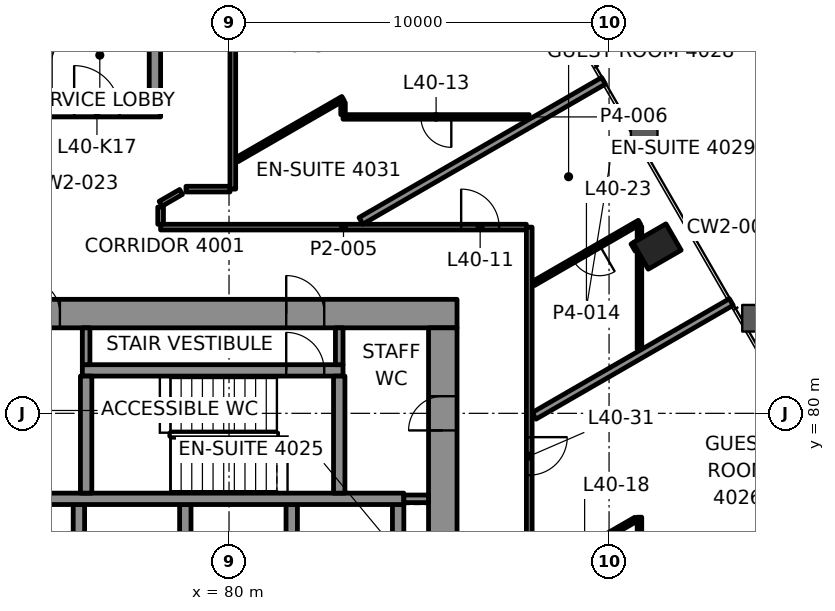
"""IFC4 building model, lengths in metres.
Left out: names, types, materials, properties, quantities, classifications, styles, units other than length and angle.
Written with IfcOpenShell. Run it as: python <this file> out.ifc"""

import sys

from ifc_helpers import new_model, si_unit, direction, frame, frame_2d, origin, origin_2d, place, context, subcontext, project, spatial, rectangle, hollow_rectangle, extrude, element, fill, save


model = new_model("IFC4")
c1 = context("Model", 3, precision=1e-05, world=origin(), true_north=direction((0.0, 1.0)))
c2 = subcontext(c1, "Body", "Model", "MODEL_VIEW")
j1 = project(units=[si_unit("LENGTHUNIT", "METRE"), si_unit("PLANEANGLEUNIT", "RADIAN")], contexts=[c1])
p1 = place(None, origin())
s1 = spatial("IfcSite", under=j1, at=p1, CompositionType="ELEMENT")
p2 = place(p1, origin())
s2 = spatial("IfcBuilding", under=s1, at=p2, CompositionType="ELEMENT")
p3 = place(p2, frame((0.0, 0.0, 175.3)))
s3 = spatial("IfcBuildingStorey", under=s2, at=p3, CompositionType="ELEMENT", Elevation=175.3)
p4 = place(p3, frame((91.263, 84.39, -0.0), z_axis=(0.0, 0.0, 1.0), x_axis=(-0.5, 0.866025403784, 0.0)))
e1 = element("IfcColumn", 1, at=p4, inside=s3, PredefinedType="COLUMN", context=c2, shape_type="SweptSolid", body=[
    extrude(hollow_rectangle(XDim=0.8, YDim=1.0, WallThickness=0.05, at=origin_2d()), origin(), (0.0, 0.0, 1.0), 3.9),
])
p5 = place(p3, frame((64.0, 82.625, 0.0), z_axis=(0.0, 0.0, 1.0), x_axis=(1.0, 0.0, 0.0)))
e2 = element("IfcWall", 2, at=p5, inside=s3, PredefinedType="SHEAR", context=c2, shape_type="SweptSolid", body=[
    extrude(rectangle(XDim=22.0, YDim=0.75, at=frame_2d((11.0, 0.0))), origin(), (0.0, 0.0, 1.0), 3.7),
])
p6 = place(p5, frame((3.695, 0.0, 0.0)))
e3 = element("IfcOpeningElement", 3, at=p6, cuts=e2, PredefinedType="OPENING", context=c2, shape_type="SweptSolid", body=[
    extrude(rectangle(XDim=1.0, YDim=2.1, at=frame_2d((0.5, 1.05))), frame((0.0, 0.385, 0.0), z_axis=(0.0, -1.0, 0.0), x_axis=(1.0, 0.0, 0.0)), (0.0, 0.0, 1.0), 0.77),
])
p7 = place(p5, frame((17.505, 0.0, 0.0)))
e4 = element("IfcOpeningElement", 4, at=p7, cuts=e2, PredefinedType="OPENING", context=c2, shape_type="SweptSolid", body=[
    extrude(rectangle(XDim=1.0, YDim=2.1, at=frame_2d((0.5, 1.05))), frame((0.0, 0.385, 0.0), z_axis=(0.0, -1.0, 0.0), x_axis=(1.0, 0.0, 0.0)), (0.0, 0.0, 1.0), 0.77),
])
p8 = place(p5, frame((10.65, 0.0, 0.0)))
e5 = element("IfcOpeningElement", 5, at=p8, cuts=e2, PredefinedType="OPENING", context=c2, shape_type="SweptSolid", body=[
    extrude(rectangle(XDim=0.9, YDim=2.1, at=frame_2d((0.45, 1.05))), frame((0.0, 0.385, 0.0), z_axis=(0.0, -1.0, 0.0), x_axis=(1.0, 0.0, 0.0)), (0.0, 0.0, 1.0), 0.77),
])
p9 = place(p3, frame((85.625, 67.75, 0.0), z_axis=(0.0, 0.0, 1.0), x_axis=(0.0, 1.0, 0.0)))
e6 = element("IfcWall", 6, at=p9, inside=s3, PredefinedType="SHEAR", context=c2, shape_type="SweptSolid", body=[
    extrude(rectangle(XDim=14.5, YDim=0.75, at=frame_2d((7.25, 0.0))), origin(), (0.0, 0.0, 1.0), 3.7),
])
p10 = place(p9, frame((4.65, 0.0, 0.0)))
e7 = element("IfcOpeningElement", 7, at=p10, cuts=e6, PredefinedType="OPENING", context=c2, shape_type="SweptSolid", body=[
    extrude(rectangle(XDim=1.8, YDim=2.1, at=frame_2d((0.9, 1.05))), frame((0.0, 0.385, 0.0), z_axis=(0.0, -1.0, 0.0), x_axis=(1.0, 0.0, 0.0)), (0.0, 0.0, 1.0), 0.77),
])
p11 = place(p9, frame((11.8, 0.0, 0.0)))
e8 = element("IfcOpeningElement", 8, at=p11, cuts=e6, PredefinedType="OPENING", context=c2, shape_type="SweptSolid", body=[
    extrude(rectangle(XDim=0.9, YDim=2.1, at=frame_2d((0.45, 1.05))), frame((0.0, 0.385, 0.0), z_axis=(0.0, -1.0, 0.0), x_axis=(1.0, 0.0, 0.0)), (0.0, 0.0, 1.0), 0.77),
])
for number, where, z_axis, x_axis in (
    (9, (76.05, 75.0, 0.0), (0.0, 0.0, 1.0), (0.0, 1.0, 0.0)),
    (10, (78.85, 75.0, 0.0), (0.0, 0.0, 1.0), (0.0, 1.0, 0.0)),
    (11, (81.65, 75.0, 0.0), (0.0, 0.0, 1.0), (0.0, 1.0, 0.0)),
    (12, (84.45, 75.0, 0.0), (0.0, 0.0, 1.0), (0.0, 1.0, 0.0)),
):
    element("IfcWall", number, at=place(p3, frame(where, z_axis=z_axis, x_axis=x_axis)), inside=s3, PredefinedType="SHEAR", context=c2, shape_type="SweptSolid", body=[
        extrude(rectangle(XDim=2.6, YDim=0.3, at=frame_2d((1.3, 0.0))), origin(), (0.0, 0.0, 1.0), 3.7),
    ])
p12 = place(p3, frame((67.15, 77.75, 0.0), z_axis=(0.0, 0.0, 1.0), x_axis=(1.0, 0.0, 0.0)))
e13 = element("IfcWall", 13, at=p12, inside=s3, PredefinedType="SHEAR", context=c2, shape_type="SweptSolid", body=[
    extrude(rectangle(XDim=17.45, YDim=0.3, at=frame_2d((8.725, 0.0))), origin(), (0.0, 0.0, 1.0), 3.7),
])
p13 = place(p12, frame((0.545, 0.0, 0.0)))
e14 = element("IfcOpeningElement", 14, at=p13, cuts=e13, PredefinedType="OPENING", context=c2, shape_type="SweptSolid", body=[
    extrude(rectangle(XDim=1.0, YDim=2.1, at=frame_2d((0.5, 1.05))), frame((0.0, 0.16, 0.0), z_axis=(0.0, -1.0, 0.0), x_axis=(1.0, 0.0, 0.0)), (0.0, 0.0, 1.0), 0.32),
])
p14 = place(p3, frame((76.14, 81.13, 0.0), z_axis=(0.0, 0.0, 1.0), x_axis=(1.0, 0.0, 0.0)))
e15 = element("IfcWall", 15, at=p14, inside=s3, PredefinedType="SHEAR", context=c2, shape_type="SweptSolid", body=[
    extrude(rectangle(XDim=6.86, YDim=0.3, at=frame_2d((3.43, 0.0))), origin(), (0.0, 0.0, 1.0), 3.7),
])
p15 = place(p14, frame((5.365, 0.0, 0.0)))
e16 = element("IfcOpeningElement", 16, at=p15, cuts=e15, PredefinedType="OPENING", context=c2, shape_type="SweptSolid", body=[
    extrude(rectangle(XDim=1.0, YDim=2.1, at=frame_2d((0.5, 1.05))), frame((0.0, 0.16, 0.0), z_axis=(0.0, -1.0, 0.0), x_axis=(1.0, 0.0, 0.0)), (0.0, 0.0, 1.0), 0.32),
])
for number, where, z_axis, x_axis in (
    (17, (76.24, 77.9, 0.0), (0.0, 0.0, 1.0), (0.0, 1.0, 0.0)),
    (18, (82.9, 77.9, 0.0), (0.0, 0.0, 1.0), (0.0, 1.0, 0.0)),
):
    element("IfcWall", number, at=place(p3, frame(where, z_axis=z_axis, x_axis=x_axis)), inside=s3, PredefinedType="SHEAR", context=c2, shape_type="SweptSolid", body=[
        extrude(rectangle(XDim=3.08, YDim=0.3, at=frame_2d((1.54, 0.0))), origin(), (0.0, 0.0, 1.0), 3.7),
    ])
p16 = place(p3, frame((71.8, 87.95, 0.0), z_axis=(0.0, 0.0, 1.0), x_axis=(1.0, 0.0, 0.0)))
e19 = element("IfcWall", 19, at=p16, inside=s3, PredefinedType="SHEAR", context=c2, shape_type="SweptSolid", body=[
    extrude(rectangle(XDim=6.4, YDim=0.3, at=frame_2d((3.2, 0.0))), origin(), (0.0, 0.0, 1.0), 3.7),
])
p17 = place(p16, frame((1.325, 0.0, 0.0)))
e20 = element("IfcOpeningElement", 20, at=p17, cuts=e19, PredefinedType="OPENING", context=c2, shape_type="SweptSolid", body=[
    extrude(rectangle(XDim=1.0, YDim=2.1, at=frame_2d((0.5, 1.05))), frame((0.0, 0.16, 0.0), z_axis=(0.0, -1.0, 0.0), x_axis=(1.0, 0.0, 0.0)), (0.0, 0.0, 1.0), 0.32),
])
p18 = place(p16, frame((4.125, 0.0, 0.0)))
e21 = element("IfcOpeningElement", 21, at=p18, cuts=e19, PredefinedType="OPENING", context=c2, shape_type="SweptSolid", body=[
    extrude(rectangle(XDim=1.2, YDim=2.1, at=frame_2d((0.6, 1.05))), frame((0.0, 0.16, 0.0), z_axis=(0.0, -1.0, 0.0), x_axis=(1.0, 0.0, 0.0)), (0.0, 0.0, 1.0), 0.32),
])
p19 = place(p3, frame((78.05, 88.1, 0.0), z_axis=(0.0, 0.0, 1.0), x_axis=(0.0, 1.0, 0.0)))
e22 = element("IfcWall", 22, at=p19, inside=s3, PredefinedType="SHEAR", context=c2, shape_type="SweptSolid", body=[
    extrude(rectangle(XDim=6.2, YDim=0.3, at=frame_2d((3.1, 0.0))), origin(), (0.0, 0.0, 1.0), 3.7),
])
p20 = place(p3, frame((78.2, 84.9, 0.0), z_axis=(0.0, 0.0, 1.0), x_axis=(1.0, 0.0, 0.0)))
e23 = element("IfcWall", 23, at=p20, inside=s3, PredefinedType="PARTITIONING", context=c2, shape_type="SweptSolid", body=[
    extrude(rectangle(XDim=9.625, YDim=0.15, at=frame_2d((4.812, 0.0))), origin(), (0.0, 0.0, 1.0), 3.1),
])
p21 = place(p20, frame((7.908, 0.0, 0.0)))
e24 = element("IfcOpeningElement", 24, at=p21, cuts=e23, PredefinedType="OPENING", context=c2, shape_type="SweptSolid", body=[
    extrude(rectangle(XDim=1.0, YDim=2.1, at=frame_2d((0.5, 1.05))), frame((0.0, 0.085, 0.0), z_axis=(0.0, -1.0, 0.0), x_axis=(1.0, 0.0, 0.0)), (0.0, 0.0, 1.0), 0.17),
])
p22 = place(p3, frame((78.868, 85.9, 0.0), z_axis=(0.0, 0.0, 1.0), x_axis=(1.0, 0.0, 0.0)))
e25 = element("IfcWall", 25, at=p22, inside=s3, PredefinedType="PARTITIONING", context=c2, shape_type="SweptSolid", body=[
    extrude(rectangle(XDim=1.157, YDim=0.15, at=frame_2d((0.578, 0.0))), origin(), (0.0, 0.0, 1.0), 3.1),
])
p23 = place(p3, frame((87.898, 87.8, 0.0), z_axis=(0.0, 0.0, 1.0), x_axis=(-1.0, 0.0, 0.0)))
e26 = element("IfcWall", 26, at=p23, inside=s3, PredefinedType="PARTITIONING", context=c2, shape_type="SweptSolid", body=[
    extrude(rectangle(XDim=4.898, YDim=0.12, at=frame_2d((2.449, 0.0))), origin(), (0.0, 0.0, 1.0), 3.1),
])
p24 = place(p23, frame((2.049, 0.0, 0.0)))
e27 = element("IfcOpeningElement", 27, at=p24, cuts=e26, PredefinedType="OPENING", context=c2, shape_type="SweptSolid", body=[
    extrude(rectangle(XDim=0.8, YDim=2.1, at=frame_2d((0.4, 1.05))), frame((0.0, 0.07, 0.0), z_axis=(0.0, -1.0, 0.0), x_axis=(1.0, 0.0, 0.0)), (0.0, 0.0, 1.0), 0.14),
])
p25 = place(p3, frame((90.705, 77.212, 0.0), z_axis=(0.0, 0.0, 1.0), x_axis=(-0.866009247561, -0.500027982357, 0.0)))
e28 = element("IfcWall", 28, at=p25, inside=s3, PredefinedType="PARTITIONING", context=c2, shape_type="SweptSolid", body=[
    extrude(rectangle(XDim=3.113, YDim=0.12, at=frame_2d((1.556, 0.0))), origin(), (0.0, 0.0, 1.0), 3.1),
])
p26 = place(p25, frame((1.156, 0.0, 0.0)))
e29 = element("IfcOpeningElement", 29, at=p26, cuts=e28, PredefinedType="OPENING", context=c2, shape_type="SweptSolid", body=[
    extrude(rectangle(XDim=0.8, YDim=2.1, at=frame_2d((0.4, 1.05))), frame((0.0, 0.07, 0.0), z_axis=(0.0, -1.0, 0.0), x_axis=(1.0, 0.0, 0.0)), (0.0, 0.0, 1.0), 0.14),
])
p27 = place(p3, frame((88.027, 79.934, 0.0), z_axis=(0.0, 0.0, 1.0), x_axis=(0.866030178321, 0.499991730169, 0.0)))
e30 = element("IfcWall", 30, at=p27, inside=s3, PredefinedType="PARTITIONING", context=c2, shape_type="SweptSolid", body=[
    extrude(rectangle(XDim=5.991, YDim=0.2, at=frame_2d((2.995, 0.0))), origin(), (0.0, 0.0, 1.0), 3.022),
])
p28 = place(p3, frame((90.8, 85.028, 0.0), z_axis=(0.0, 0.0, 1.0), x_axis=(-0.866010186656, -0.500026355914, 0.0)))
e31 = element("IfcWall", 31, at=p28, inside=s3, PredefinedType="PARTITIONING", context=c2, shape_type="SweptSolid", body=[
    extrude(rectangle(XDim=3.222, YDim=0.12, at=frame_2d((1.611, 0.0))), origin(), (0.0, 0.0, 1.0), 3.022),
])
p29 = place(p28, frame((1.211, 0.0, 0.0)))
e32 = element("IfcOpeningElement", 32, at=p29, cuts=e31, PredefinedType="OPENING", context=c2, shape_type="SweptSolid", body=[
    extrude(rectangle(XDim=0.8, YDim=2.1, at=frame_2d((0.4, 1.05))), frame((0.0, 0.07, 0.0), z_axis=(0.0, -1.0, 0.0), x_axis=(1.0, 0.0, 0.0)), (0.0, 0.0, 1.0), 0.14),
])
p30 = place(p3, frame((83.471, 85.065, 0.0), z_axis=(0.0, 0.0, 1.0), x_axis=(0.866022862013, 0.500004402451, 0.0)))
e33 = element("IfcWall", 33, at=p30, inside=s3, PredefinedType="PARTITIONING", context=c2, shape_type="SweptSolid", body=[
    extrude(rectangle(XDim=7.371, YDim=0.2, at=frame_2d((3.685, 0.0))), origin(), (0.0, 0.0, 1.0), 3.022),
])
p31 = place(p3, frame((78.2, 85.515, 0.0), z_axis=(0.0, 0.0, 1.0), x_axis=(0.866035156036, 0.499983108224, 0.0)))
e34 = element("IfcWall", 34, at=p31, inside=s3, PredefinedType="PARTITIONING", context=c2, shape_type="SweptSolid", body=[
    extrude(rectangle(XDim=0.622, YDim=0.15, at=frame_2d((0.311, 0.0))), origin(), (0.0, 0.0, 1.0), 3.1),
])
p32 = place(p3, frame((80.209, 86.675, 0.0), z_axis=(0.0, 0.0, 1.0), x_axis=(0.86604299788, 0.499969524894, 0.0)))
e35 = element("IfcWall", 35, at=p32, inside=s3, PredefinedType="PARTITIONING", context=c2, shape_type="SweptSolid", body=[
    extrude(rectangle(XDim=3.222, YDim=0.12, at=frame_2d((1.611, 0.0))), origin(), (0.0, 0.0, 1.0), 3.1),
])
p33 = place(p3, frame((90.8, 73.929, 0.0), z_axis=(0.0, 0.0, 1.0), x_axis=(0.0, 1.0, 0.0)))
e36 = element("IfcWall", 36, at=p33, inside=s3, PredefinedType="PARTITIONING", context=c2, shape_type="SweptSolid", body=[
    extrude(rectangle(XDim=3.337, YDim=0.12, at=frame_2d((1.668, 0.0))), origin(), (0.0, 0.0, 1.0), 3.1),
])
p34 = place(p3, frame((90.8, 81.69, 0.0), z_axis=(0.0, 0.0, 1.0), x_axis=(0.0, 1.0, 0.0)))
e37 = element("IfcWall", 37, at=p34, inside=s3, PredefinedType="PARTITIONING", context=c2, shape_type="SweptSolid", body=[
    extrude(rectangle(XDim=2.502, YDim=0.12, at=frame_2d((1.251, 0.0))), origin(), (0.0, 0.0, 1.0), 3.1),
])
p35 = place(p3, frame((90.8, 84.584, 0.0), z_axis=(0.0, 0.0, 1.0), x_axis=(0.0, 1.0, 0.0)))
e38 = element("IfcWall", 38, at=p35, inside=s3, PredefinedType="PARTITIONING", context=c2, shape_type="SweptSolid", body=[
    extrude(rectangle(XDim=0.334, YDim=0.12, at=frame_2d((0.167, 0.0))), origin(), (0.0, 0.0, 1.0), 3.022),
])
p36 = place(p3, frame((87.9, 84.899, 0.0), z_axis=(0.0, 0.0, 1.0), x_axis=(0.0, -1.0, 0.0)))
e39 = element("IfcWall", 39, at=p36, inside=s3, PredefinedType="PARTITIONING", context=c2, shape_type="SweptSolid", body=[
    extrude(rectangle(XDim=16.308, YDim=0.15, at=frame_2d((8.154, 0.0))), origin(), (0.0, 0.0, 1.0), 3.1),
])
p37 = place(p36, frame((5.527, 0.0, 0.0)))
e40 = element("IfcOpeningElement", 40, at=p37, cuts=e39, PredefinedType="OPENING", context=c2, shape_type="SweptSolid", body=[
    extrude(rectangle(XDim=1.0, YDim=2.1, at=frame_2d((0.5, 1.05))), frame((0.0, 0.085, 0.0), z_axis=(0.0, -1.0, 0.0), x_axis=(1.0, 0.0, 0.0)), (0.0, 0.0, 1.0), 0.17),
])
p38 = place(p36, frame((13.074, 0.0, 0.0)))
e41 = element("IfcOpeningElement", 41, at=p38, cuts=e39, PredefinedType="OPENING", context=c2, shape_type="SweptSolid", body=[
    extrude(rectangle(XDim=1.0, YDim=2.1, at=frame_2d((0.5, 1.05))), frame((0.0, 0.085, 0.0), z_axis=(0.0, -1.0, 0.0), x_axis=(1.0, 0.0, 0.0)), (0.0, 0.0, 1.0), 0.17),
])
p39 = place(p3, frame((83.0, 87.86, 0.0), z_axis=(0.0, 0.0, 1.0), x_axis=(0.0, 1.0, 0.0)))
e42 = element("IfcWall", 42, at=p39, inside=s3, PredefinedType="PARTITIONING", context=c2, shape_type="SweptSolid", body=[
    extrude(rectangle(XDim=0.316, YDim=0.12, at=frame_2d((0.158, 0.0))), origin(), (0.0, 0.0, 1.0), 3.1),
])
p40 = place(p3, frame((80.1, 96.5, 0.0), z_axis=(0.0, 0.0, 1.0), x_axis=(0.0, -1.0, 0.0)))
e43 = element("IfcWall", 43, at=p40, inside=s3, PredefinedType="PARTITIONING", context=c2, shape_type="SweptSolid", body=[
    extrude(rectangle(XDim=10.6, YDim=0.15, at=frame_2d((5.3, 0.0))), origin(), (0.0, 0.0, 1.0), 3.022),
])
p41 = place(p40, frame((3.909, 0.0, 0.0)))
e44 = element("IfcOpeningElement", 44, at=p41, cuts=e43, PredefinedType="OPENING", context=c2, shape_type="SweptSolid", body=[
    extrude(rectangle(XDim=1.0, YDim=2.1, at=frame_2d((0.5, 1.05))), frame((0.0, 0.085, 0.0), z_axis=(0.0, -1.0, 0.0), x_axis=(1.0, 0.0, 0.0)), (0.0, 0.0, 1.0), 0.17),
])
p42 = place(p3, frame((78.2, 84.975, 0.0), z_axis=(0.0, 0.0, 1.0), x_axis=(0.0, 1.0, 0.0)))
e45 = element("IfcWall", 45, at=p42, inside=s3, PredefinedType="PARTITIONING", context=c2, shape_type="SweptSolid", body=[
    extrude(rectangle(XDim=0.453, YDim=0.15, at=frame_2d((0.226, 0.0))), origin(), (0.0, 0.0, 1.0), 3.1),
])
p43 = place(p3, frame((90.74, 84.296, 0.0), z_axis=(0.0, 0.0, 1.0), x_axis=(-0.500333292614, 0.865832891673, 0.0)))
e46 = element("IfcWall", 46, at=p43, inside=s3, PredefinedType="PARTITIONING", context=c2, shape_type="SweptSolid", body=[
    extrude(rectangle(XDim=0.219, YDim=0.12, at=frame_2d((0.109, 0.0))), origin(), (0.0, 0.0, 1.0), 3.1),
])
p44 = place(p3, frame((84.6, 77.75, 0.0), z_axis=(0.0, 0.0, 1.0), x_axis=(1.0, 0.0, 0.0)))
e47 = element("IfcWall", 47, at=p44, inside=s3, PredefinedType="PARTITIONING", context=c2, shape_type="SweptSolid", body=[
    extrude(rectangle(XDim=0.65, YDim=0.2, at=frame_2d((0.325, 0.0))), origin(), (0.0, 0.0, 1.0), 3.7),
])
for number, where, z_axis, x_axis in (
    (48, (76.24, 81.28, 0.0), (0.0, 0.0, 1.0), (0.0, 1.0, 0.0)),
    (49, (82.9, 81.28, 0.0), (0.0, 0.0, 1.0), (0.0, 1.0, 0.0)),
):
    element("IfcWall", number, at=place(p3, frame(where, z_axis=z_axis, x_axis=x_axis)), inside=s3, PredefinedType="PARTITIONING", context=c2, shape_type="SweptSolid", body=[
        extrude(rectangle(XDim=0.97, YDim=0.2, at=frame_2d((0.485, 0.0))), origin(), (0.0, 0.0, 1.0), 3.7),
    ])
p45 = place(p21, origin())
e50 = element("IfcDoor", 50, at=p45, inside=s3, OperationType="SINGLE_SWING_LEFT", PredefinedType="DOOR", context=c2, shape_type="SweptSolid", body=[
    extrude(rectangle(XDim=1.0, YDim=2.1, at=frame_2d((0.5, 1.05))), frame((0.0, 0.025, 0.0), z_axis=(0.0, -1.0, 0.0), x_axis=(1.0, 0.0, 0.0)), (0.0, 0.0, 1.0), 0.05),
])
fill(e24, e50)
p46 = place(p24, origin())
e51 = element("IfcDoor", 51, at=p46, inside=s3, OperationType="SINGLE_SWING_LEFT", PredefinedType="DOOR", context=c2, shape_type="SweptSolid", body=[
    extrude(rectangle(XDim=0.8, YDim=2.1, at=frame_2d((0.4, 1.05))), frame((0.0, 0.025, 0.0), z_axis=(0.0, -1.0, 0.0), x_axis=(1.0, 0.0, 0.0)), (0.0, 0.0, 1.0), 0.05),
])
fill(e27, e51)
p47 = place(p29, origin())
e52 = element("IfcDoor", 52, at=p47, inside=s3, OperationType="SINGLE_SWING_LEFT", PredefinedType="DOOR", context=c2, shape_type="SweptSolid", body=[
    extrude(rectangle(XDim=0.8, YDim=2.1, at=frame_2d((0.4, 1.05))), frame((0.0, 0.025, 0.0), z_axis=(0.0, -1.0, 0.0), x_axis=(1.0, 0.0, 0.0)), (0.0, 0.0, 1.0), 0.05),
])
fill(e32, e52)
p48 = place(p37, origin())
e53 = element("IfcDoor", 53, at=p48, inside=s3, OperationType="SINGLE_SWING_RIGHT", PredefinedType="DOOR", context=c2, shape_type="SweptSolid", body=[
    extrude(rectangle(XDim=1.0, YDim=2.1, at=frame_2d((0.5, 1.05))), frame((0.0, 0.025, 0.0), z_axis=(0.0, -1.0, 0.0), x_axis=(1.0, 0.0, 0.0)), (0.0, 0.0, 1.0), 0.05),
])
fill(e40, e53)
p49 = place(p15, origin())
e54 = element("IfcDoor", 54, at=p49, inside=s3, OperationType="SINGLE_SWING_RIGHT", PredefinedType="DOOR", context=c2, shape_type="SweptSolid", body=[
    extrude(rectangle(XDim=1.0, YDim=2.1, at=frame_2d((0.5, 1.05))), frame((0.0, 0.025, 0.0), z_axis=(0.0, -1.0, 0.0), x_axis=(1.0, 0.0, 0.0)), (0.0, 0.0, 1.0), 0.05),
])
fill(e16, e54)
p50 = place(p7, origin())
e55 = element("IfcDoor", 55, at=p50, inside=s3, OperationType="SINGLE_SWING_LEFT", PredefinedType="DOOR", context=c2, shape_type="SweptSolid", body=[
    extrude(rectangle(XDim=1.0, YDim=2.1, at=frame_2d((0.5, 1.05))), frame((0.0, 0.095, 0.0), z_axis=(0.0, -1.0, 0.0), x_axis=(1.0, 0.0, 0.0)), (0.0, 0.0, 1.0), 0.19),
])
fill(e4, e55)
p51 = place(p18, origin())
e56 = element("IfcDoor", 56, at=p51, inside=s3, OperationType="SINGLE_SWING_RIGHT", PredefinedType="DOOR", context=c2, shape_type="SweptSolid", body=[
    extrude(rectangle(XDim=1.2, YDim=2.1, at=frame_2d((0.6, 1.05))), frame((0.0, 0.025, 0.0), z_axis=(0.0, -1.0, 0.0), x_axis=(1.0, 0.0, 0.0)), (0.0, 0.0, 1.0), 0.05),
])
fill(e21, e56)
p52 = place(p8, origin())
e57 = element("IfcDoor", 57, at=p52, inside=s3, OperationType="SINGLE_SWING_RIGHT", PredefinedType="DOOR", context=c2, shape_type="SweptSolid", body=[
    extrude(rectangle(XDim=0.9, YDim=2.1, at=frame_2d((0.45, 1.05))), frame((0.0, 0.095, 0.0), z_axis=(0.0, -1.0, 0.0), x_axis=(1.0, 0.0, 0.0)), (0.0, 0.0, 1.0), 0.19),
])
fill(e5, e57)
p53 = place(p11, origin())
e58 = element("IfcDoor", 58, at=p53, inside=s3, OperationType="SINGLE_SWING_LEFT", PredefinedType="DOOR", context=c2, shape_type="SweptSolid", body=[
    extrude(rectangle(XDim=0.9, YDim=2.1, at=frame_2d((0.45, 1.05))), frame((0.0, 0.095, 0.0), z_axis=(0.0, -1.0, 0.0), x_axis=(1.0, 0.0, 0.0)), (0.0, 0.0, 1.0), 0.19),
])
fill(e8, e58)
save(model, sys.argv[1])
